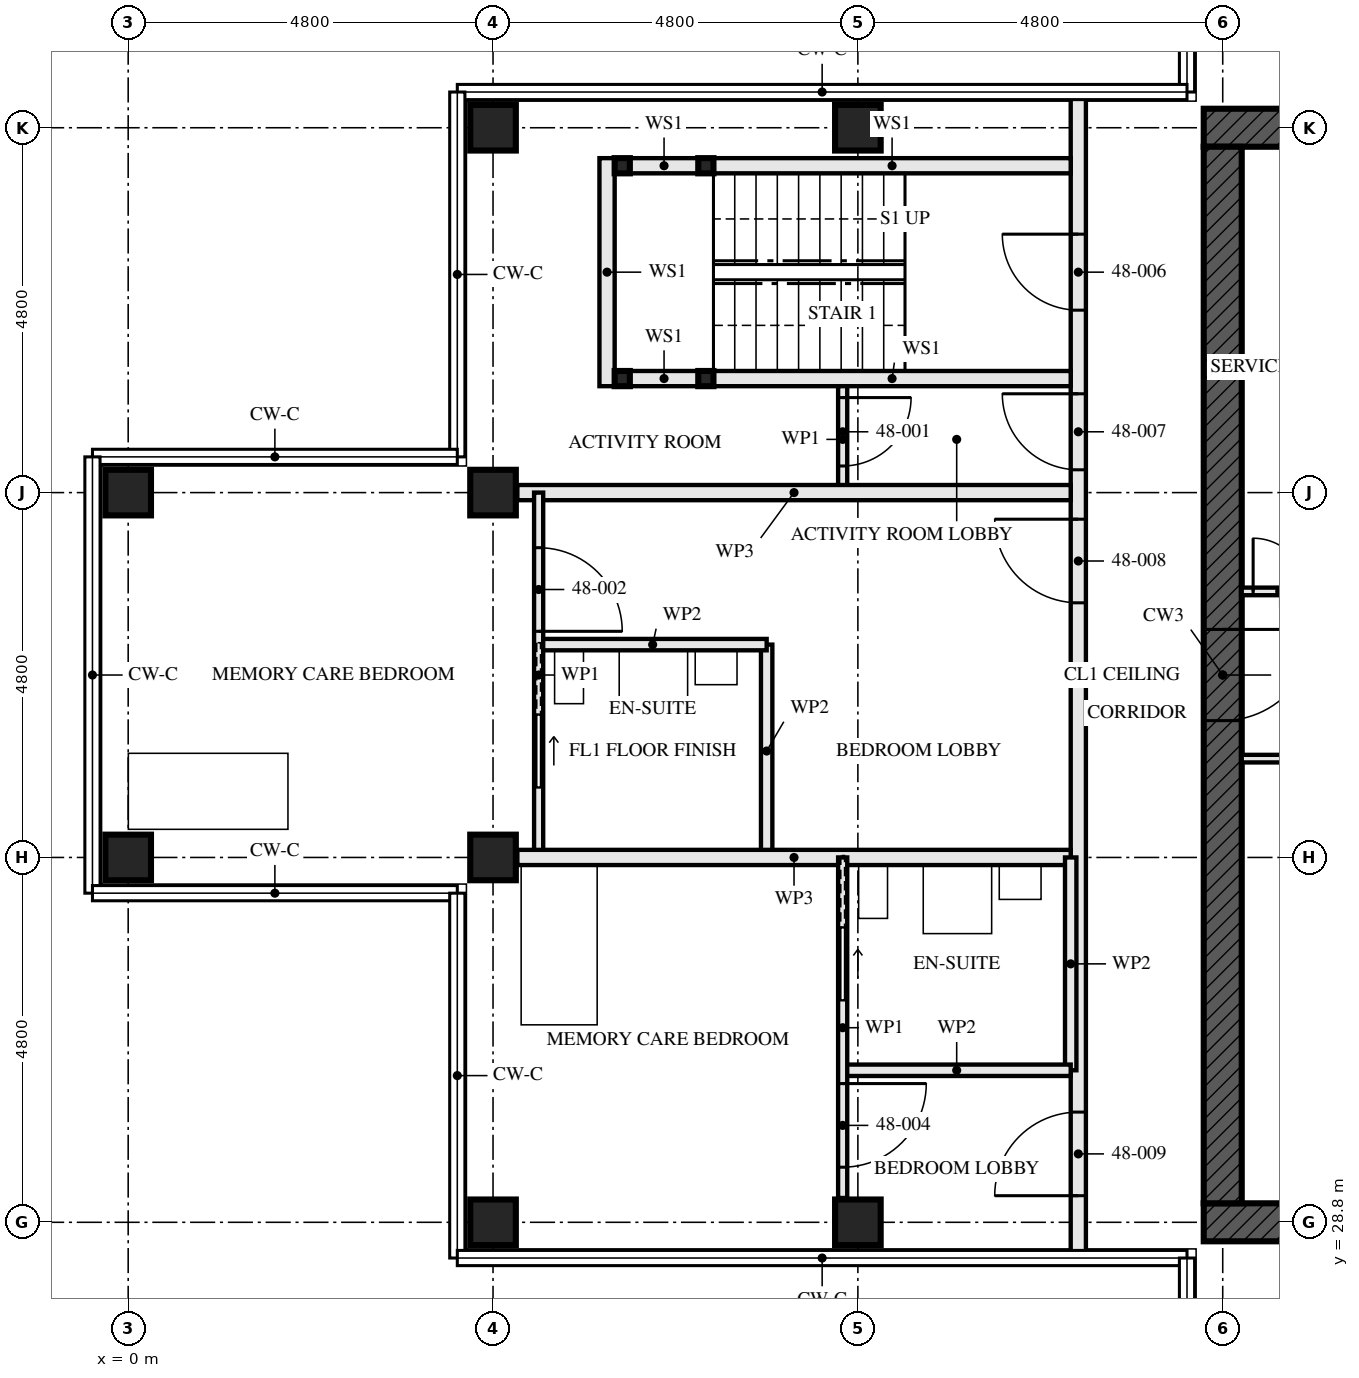
"""IFC4 building model, lengths in metres.
Left out: names, types, materials, properties, quantities, classifications, styles, units other than length and angle.
Written with IfcOpenShell. Run it as: python <this file> out.ifc"""

import sys

from ifc_helpers import new_model, si_unit, direction, frame, frame_2d, origin, origin_2d, place, context, subcontext, project, spatial, rectangle, hollow_rectangle, extrude, element, fill, save


model = new_model("IFC4")
c1 = context("Model", 3, precision=1e-05, world=origin(), true_north=direction((0.0, 1.0)))
c2 = subcontext(c1, "Body", "Model", "MODEL_VIEW")
j1 = project(units=[si_unit("LENGTHUNIT", "METRE"), si_unit("PLANEANGLEUNIT", "RADIAN")], contexts=[c1])
p1 = place(None, origin())
s1 = spatial("IfcSite", under=j1, at=p1, CompositionType="ELEMENT")
p2 = place(p1, origin())
s2 = spatial("IfcBuilding", under=s1, at=p2, CompositionType="ELEMENT")
p3 = place(p2, frame((0.0, 0.0, 176.0)))
s3 = spatial("IfcBuildingStorey", under=s2, at=p3, CompositionType="ELEMENT", Elevation=176.0)
for number, where, z_axis, x_axis in (
    (1, (0.0, 33.6, 0.0), (0.0, 0.0, 1.0), (0.0, 1.0, 0.0)),
    (2, (0.0, 38.4, 0.0), (0.0, 0.0, 1.0), (0.0, 1.0, 0.0)),
    (3, (4.8, 28.8, 0.0), (0.0, 0.0, 1.0), (0.0, 1.0, 0.0)),
    (4, (4.8, 33.6, 0.0), (0.0, 0.0, 1.0), (0.0, 1.0, 0.0)),
    (5, (4.8, 38.4, 0.0), (0.0, 0.0, 1.0), (0.0, 1.0, 0.0)),
    (6, (4.8, 43.2, 0.0), (0.0, 0.0, 1.0), (0.0, 1.0, 0.0)),
    (7, (9.6, 28.8, 0.0), (0.0, 0.0, 1.0), (0.0, 1.0, 0.0)),
    (8, (9.6, 43.2, 0.0), (0.0, 0.0, 1.0), (0.0, 1.0, 0.0)),
):
    element("IfcColumn", number, at=place(p3, frame(where, z_axis=z_axis, x_axis=x_axis)), inside=s3, PredefinedType="COLUMN", context=c2, shape_type="SweptSolid", body=[
        extrude(hollow_rectangle(XDim=0.6, YDim=0.6, WallThickness=0.08, at=origin_2d()), origin(), (0.0, 0.0, 1.0), 3.5),
    ])
p4 = place(p3, frame((14.15, 28.8, -0.17), z_axis=(0.0, 0.0, 1.0), x_axis=(1.0, 0.0, 0.0)))
e9 = element("IfcWall", 9, at=p4, inside=s3, PredefinedType="SHEAR", context=c2, shape_type="SweptSolid", body=[
    extrude(rectangle(XDim=14.9, YDim=0.5, at=frame_2d((7.45, 0.0))), origin(), (0.0, 0.0, 1.0), 3.5),
])
p5 = place(p4, frame((6.85, 0.0, 0.17)))
e10 = element("IfcOpeningElement", 10, at=p5, cuts=e9, PredefinedType="OPENING", context=c2, shape_type="SweptSolid", body=[
    extrude(rectangle(XDim=1.2, YDim=2.1, at=frame_2d((0.6, 1.05))), frame((0.0, 0.26, 0.0), z_axis=(0.0, -1.0, 0.0), x_axis=(1.0, 0.0, 0.0)), (0.0, 0.0, 1.0), 0.521),
])
p6 = place(p3, frame((29.05, 43.2, -0.17), z_axis=(0.0, 0.0, 1.0), x_axis=(-1.0, 0.0, 0.0)))
e11 = element("IfcWall", 11, at=p6, inside=s3, PredefinedType="SHEAR", context=c2, shape_type="SweptSolid", body=[
    extrude(rectangle(XDim=14.9, YDim=0.5, at=frame_2d((7.45, 0.0))), origin(), (0.0, 0.0, 1.0), 3.5),
])
p7 = place(p6, frame((6.85, 0.0, 0.17)))
e12 = element("IfcOpeningElement", 12, at=p7, cuts=e11, PredefinedType="OPENING", context=c2, shape_type="SweptSolid", body=[
    extrude(rectangle(XDim=1.2, YDim=2.1, at=frame_2d((0.6, 1.05))), frame((0.0, 0.26, 0.0), z_axis=(0.0, -1.0, 0.0), x_axis=(1.0, 0.0, 0.0)), (0.0, 0.0, 1.0), 0.521),
])
p8 = place(p3, frame((14.4, 42.95, -0.17), z_axis=(0.0, 0.0, 1.0), x_axis=(0.0, -1.0, 0.0)))
e13 = element("IfcWall", 13, at=p8, inside=s3, PredefinedType="SHEAR", context=c2, shape_type="SweptSolid", body=[
    extrude(rectangle(XDim=13.9, YDim=0.5, at=frame_2d((6.95, 0.0))), origin(), (0.0, 0.0, 1.0), 3.5),
])
p9 = place(p8, frame((6.35, 0.0, 0.17)))
e14 = element("IfcOpeningElement", 14, at=p9, cuts=e13, PredefinedType="OPENING", context=c2, shape_type="SweptSolid", body=[
    extrude(rectangle(XDim=1.2, YDim=2.1, at=frame_2d((0.6, 1.05))), frame((0.0, 0.26, 0.0), z_axis=(0.0, -1.0, 0.0), x_axis=(1.0, 0.0, 0.0)), (0.0, 0.0, 1.0), 0.521),
])
for number, where, z_axis, x_axis in (
    (15, (6.5, 42.7, 0.0), (0.0, 0.0, 1.0), (1.0, 0.0, 0.0)),
    (16, (6.5, 39.9, 0.0), (0.0, 0.0, 1.0), (1.0, 0.0, 0.0)),
    (17, (7.6, 42.7, 0.0), (0.0, 0.0, 1.0), (1.0, 0.0, 0.0)),
    (18, (7.6, 39.9, 0.0), (0.0, 0.0, 1.0), (1.0, 0.0, 0.0)),
):
    element("IfcColumn", number, at=place(p3, frame(where, z_axis=z_axis, x_axis=x_axis)), inside=s3, PredefinedType="COLUMN", context=c2, shape_type="SweptSolid", body=[
        extrude(hollow_rectangle(XDim=0.2, YDim=0.2, WallThickness=0.008, at=origin_2d()), origin(), (0.0, 0.0, 1.0), 3.33),
    ])
p10 = place(p3, frame((6.6, 42.7, 0.0), z_axis=(0.0, 0.0, 1.0), x_axis=(1.0, 0.0, 0.0)))
e19 = element("IfcWall", 19, at=p10, inside=s3, PredefinedType="SOLIDWALL", context=c2, shape_type="SweptSolid", body=[
    extrude(rectangle(XDim=0.9, YDim=0.2, at=frame_2d((0.45, 0.0))), origin(), (0.0, 0.0, 1.0), 2.99),
])
p11 = place(p3, frame((7.7, 42.7, 0.0), z_axis=(0.0, 0.0, 1.0), x_axis=(1.0, 0.0, 0.0)))
e20 = element("IfcWall", 20, at=p11, inside=s3, PredefinedType="SOLIDWALL", context=c2, shape_type="SweptSolid", body=[
    extrude(rectangle(XDim=4.7, YDim=0.2, at=frame_2d((2.35, 0.0))), origin(), (0.0, 0.0, 1.0), 2.99),
])
p12 = place(p3, frame((6.6, 39.9, 0.0), z_axis=(0.0, 0.0, 1.0), x_axis=(1.0, 0.0, 0.0)))
e21 = element("IfcWall", 21, at=p12, inside=s3, PredefinedType="SOLIDWALL", context=c2, shape_type="SweptSolid", body=[
    extrude(rectangle(XDim=0.9, YDim=0.2, at=frame_2d((0.45, 0.0))), origin(), (0.0, 0.0, 1.0), 2.99),
])
p13 = place(p3, frame((7.7, 39.9, 0.0), z_axis=(0.0, 0.0, 1.0), x_axis=(1.0, 0.0, 0.0)))
e22 = element("IfcWall", 22, at=p13, inside=s3, PredefinedType="SOLIDWALL", context=c2, shape_type="SweptSolid", body=[
    extrude(rectangle(XDim=4.7, YDim=0.2, at=frame_2d((2.35, 0.0))), origin(), (0.0, 0.0, 1.0), 2.99),
])
p14 = place(p3, frame((6.3, 42.8, 0.0), z_axis=(0.0, 0.0, 1.0), x_axis=(0.0, -1.0, 0.0)))
e23 = element("IfcWall", 23, at=p14, inside=s3, PredefinedType="SOLIDWALL", context=c2, shape_type="SweptSolid", body=[
    extrude(rectangle(XDim=3.0, YDim=0.2, at=frame_2d((1.5, 0.0))), origin(), (0.0, 0.0, 1.0), 3.33),
])
p15 = place(p3, frame((9.4, 39.8, 0.0), z_axis=(0.0, 0.0, 1.0), x_axis=(0.0, -1.0, 0.0)))
e24 = element("IfcWall", 24, at=p15, inside=s3, PredefinedType="PARTITIONING", context=c2, shape_type="SweptSolid", body=[
    extrude(rectangle(XDim=1.4, YDim=0.12, at=frame_2d((0.7, 0.0))), origin(), (0.0, 0.0, 1.0), 3.33),
])
p16 = place(p15, frame((0.15, 0.0, 0.0)))
e25 = element("IfcOpeningElement", 25, at=p16, cuts=e24, PredefinedType="OPENING", context=c2, shape_type="SweptSolid", body=[
    extrude(rectangle(XDim=0.9, YDim=2.1, at=frame_2d((0.45, 1.05))), frame((0.0, 0.071, 0.0), z_axis=(0.0, -1.0, 0.0), x_axis=(1.0, 0.0, 0.0)), (0.0, 0.0, 1.0), 0.141),
])
p17 = place(p3, frame((5.12, 38.4, 0.0), z_axis=(0.0, 0.0, 1.0), x_axis=(1.0, 0.0, 0.0)))
e26 = element("IfcWall", 26, at=p17, inside=s3, PredefinedType="PARTITIONING", context=c2, shape_type="SweptSolid", body=[
    extrude(rectangle(XDim=7.28, YDim=0.2, at=frame_2d((3.64, 0.0))), origin(), (0.0, 0.0, 1.0), 2.55),
])
p18 = place(p3, frame((5.4, 36.4, 0.0), z_axis=(0.0, 0.0, 1.0), x_axis=(1.0, 0.0, 0.0)))
e27 = element("IfcWall", 27, at=p18, inside=s3, PredefinedType="PARTITIONING", context=c2, shape_type="SweptSolid", body=[
    extrude(rectangle(XDim=3.0, YDim=0.15, at=frame_2d((1.5, 0.0))), origin(), (0.0, 0.0, 1.0), 3.33),
])
p19 = place(p3, frame((8.4, 36.4, 0.0), z_axis=(0.0, 0.0, 1.0), x_axis=(0.0, -1.0, 0.0)))
e28 = element("IfcWall", 28, at=p19, inside=s3, PredefinedType="PARTITIONING", context=c2, shape_type="SweptSolid", body=[
    extrude(rectangle(XDim=2.8, YDim=0.15, at=frame_2d((1.4, 0.0))), origin(), (0.0, 0.0, 1.0), 3.33),
])
p20 = place(p3, frame((5.4, 38.4, 0.0), z_axis=(0.0, 0.0, 1.0), x_axis=(0.0, -1.0, 0.0)))
e29 = element("IfcWall", 29, at=p20, inside=s3, PredefinedType="PARTITIONING", context=c2, shape_type="SweptSolid", body=[
    extrude(rectangle(XDim=4.8, YDim=0.12, at=frame_2d((2.4, 0.0))), origin(), (0.0, 0.0, 1.0), 3.33),
])
p21 = place(p20, frame((0.725, 0.0, 0.0)))
e30 = element("IfcOpeningElement", 30, at=p21, cuts=e29, PredefinedType="OPENING", context=c2, shape_type="SweptSolid", body=[
    extrude(rectangle(XDim=1.1, YDim=2.1, at=frame_2d((0.55, 1.05))), frame((0.0, 0.071, 0.0), z_axis=(0.0, -1.0, 0.0), x_axis=(1.0, 0.0, 0.0)), (0.0, 0.0, 1.0), 0.141),
])
p22 = place(p20, frame((2.925, 0.0, 0.0)))
e31 = element("IfcOpeningElement", 31, at=p22, cuts=e29, PredefinedType="OPENING", context=c2, shape_type="SweptSolid", body=[
    extrude(rectangle(XDim=0.95, YDim=2.1, at=frame_2d((0.475, 1.05))), frame((0.0, 0.071, 0.0), z_axis=(0.0, -1.0, 0.0), x_axis=(1.0, 0.0, 0.0)), (0.0, 0.0, 1.0), 0.141),
])
p23 = place(p3, frame((5.12, 33.6, 0.0), z_axis=(0.0, 0.0, 1.0), x_axis=(1.0, 0.0, 0.0)))
e32 = element("IfcWall", 32, at=p23, inside=s3, PredefinedType="PARTITIONING", context=c2, shape_type="SweptSolid", body=[
    extrude(rectangle(XDim=7.28, YDim=0.2, at=frame_2d((3.64, 0.0))), origin(), (0.0, 0.0, 1.0), 2.55),
])
p24 = place(p3, frame((9.4, 30.8, 0.0), z_axis=(0.0, 0.0, 1.0), x_axis=(1.0, 0.0, 0.0)))
e33 = element("IfcWall", 33, at=p24, inside=s3, PredefinedType="PARTITIONING", context=c2, shape_type="SweptSolid", body=[
    extrude(rectangle(XDim=3.0, YDim=0.15, at=frame_2d((1.5, 0.0))), origin(), (0.0, 0.0, 1.0), 3.33),
])
p25 = place(p3, frame((12.4, 33.6, 0.0), z_axis=(0.0, 0.0, 1.0), x_axis=(0.0, -1.0, 0.0)))
e34 = element("IfcWall", 34, at=p25, inside=s3, PredefinedType="PARTITIONING", context=c2, shape_type="SweptSolid", body=[
    extrude(rectangle(XDim=2.8, YDim=0.15, at=frame_2d((1.4, 0.0))), origin(), (0.0, 0.0, 1.0), 3.33),
])
p26 = place(p3, frame((9.4, 33.6, 0.0), z_axis=(0.0, 0.0, 1.0), x_axis=(0.0, -1.0, 0.0)))
e35 = element("IfcWall", 35, at=p26, inside=s3, PredefinedType="PARTITIONING", context=c2, shape_type="SweptSolid", body=[
    extrude(rectangle(XDim=4.48, YDim=0.12, at=frame_2d((2.24, 0.0))), origin(), (0.0, 0.0, 1.0), 3.33),
])
p27 = place(p26, frame((2.975, 0.0, 0.0)))
e36 = element("IfcOpeningElement", 36, at=p27, cuts=e35, PredefinedType="OPENING", context=c2, shape_type="SweptSolid", body=[
    extrude(rectangle(XDim=1.1, YDim=2.1, at=frame_2d((0.55, 1.05))), frame((0.0, 0.071, 0.0), z_axis=(0.0, -1.0, 0.0), x_axis=(1.0, 0.0, 0.0)), (0.0, 0.0, 1.0), 0.141),
])
p28 = place(p26, frame((0.925, 0.0, 0.0)))
e37 = element("IfcOpeningElement", 37, at=p28, cuts=e35, PredefinedType="OPENING", context=c2, shape_type="SweptSolid", body=[
    extrude(rectangle(XDim=0.95, YDim=2.1, at=frame_2d((0.475, 1.05))), frame((0.0, 0.071, 0.0), z_axis=(0.0, -1.0, 0.0), x_axis=(1.0, 0.0, 0.0)), (0.0, 0.0, 1.0), 0.141),
])
p29 = place(p3, frame((12.5, 43.65, 0.0), z_axis=(0.0, 0.0, 1.0), x_axis=(0.0, -1.0, 0.0)))
e38 = element("IfcWall", 38, at=p29, inside=s3, PredefinedType="PARTITIONING", context=c2, shape_type="SweptSolid", body=[
    extrude(rectangle(XDim=15.3, YDim=0.2, at=frame_2d((7.65, 0.0))), origin(), (0.0, 0.0, 1.0), 2.32),
])
p30 = place(p29, frame((1.85, 0.0, 0.0)))
e39 = element("IfcOpeningElement", 39, at=p30, cuts=e38, PredefinedType="OPENING", context=c2, shape_type="SweptSolid", body=[
    extrude(rectangle(XDim=1.0, YDim=2.1, at=frame_2d((0.5, 1.05))), frame((0.0, 0.111, 0.0), z_axis=(0.0, -1.0, 0.0), x_axis=(1.0, 0.0, 0.0)), (0.0, 0.0, 1.0), 0.221),
])
p31 = place(p29, frame((3.95, 0.0, 0.0)))
e40 = element("IfcOpeningElement", 40, at=p31, cuts=e38, PredefinedType="OPENING", context=c2, shape_type="SweptSolid", body=[
    extrude(rectangle(XDim=1.0, YDim=2.1, at=frame_2d((0.5, 1.05))), frame((0.0, 0.111, 0.0), z_axis=(0.0, -1.0, 0.0), x_axis=(1.0, 0.0, 0.0)), (0.0, 0.0, 1.0), 0.221),
])
p32 = place(p29, frame((5.6, 0.0, 0.0)))
e41 = element("IfcOpeningElement", 41, at=p32, cuts=e38, PredefinedType="OPENING", context=c2, shape_type="SweptSolid", body=[
    extrude(rectangle(XDim=1.1, YDim=2.1, at=frame_2d((0.55, 1.05))), frame((0.0, 0.111, 0.0), z_axis=(0.0, -1.0, 0.0), x_axis=(1.0, 0.0, 0.0)), (0.0, 0.0, 1.0), 0.221),
])
p33 = place(p29, frame((13.4, 0.0, 0.0)))
e42 = element("IfcOpeningElement", 42, at=p33, cuts=e38, PredefinedType="OPENING", context=c2, shape_type="SweptSolid", body=[
    extrude(rectangle(XDim=1.1, YDim=2.1, at=frame_2d((0.55, 1.05))), frame((0.0, 0.111, 0.0), z_axis=(0.0, -1.0, 0.0), x_axis=(1.0, 0.0, 0.0)), (0.0, 0.0, 1.0), 0.221),
])
p34 = place(p3, frame((14.65, 34.9, 0.0), z_axis=(0.0, 0.0, 1.0), x_axis=(1.0, 0.0, 0.0)))
e43 = element("IfcWall", 43, at=p34, inside=s3, PredefinedType="SOLIDWALL", context=c2, shape_type="SweptSolid", body=[
    extrude(rectangle(XDim=5.9, YDim=0.1, at=frame_2d((2.95, 0.0))), origin(), (0.0, 0.0, 1.0), 3.33),
])
p35 = place(p34, frame((1.6, 0.0, 0.0)))
e44 = element("IfcOpeningElement", 44, at=p35, cuts=e43, PredefinedType="OPENING", context=c2, shape_type="SweptSolid", body=[
    extrude(rectangle(XDim=0.7, YDim=2.1, at=frame_2d((0.35, 1.05))), frame((0.0, 0.061, 0.0), z_axis=(0.0, -1.0, 0.0), x_axis=(1.0, 0.0, 0.0)), (0.0, 0.0, 1.0), 0.121),
])
p36 = place(p3, frame((14.65, 37.1, 0.0), z_axis=(0.0, 0.0, 1.0), x_axis=(1.0, 0.0, 0.0)))
e45 = element("IfcWall", 45, at=p36, inside=s3, PredefinedType="SOLIDWALL", context=c2, shape_type="SweptSolid", body=[
    extrude(rectangle(XDim=5.9, YDim=0.1, at=frame_2d((2.95, 0.0))), origin(), (0.0, 0.0, 1.0), 3.33),
])
p37 = place(p36, frame((0.15, 0.0, 0.0)))
e46 = element("IfcOpeningElement", 46, at=p37, cuts=e45, PredefinedType="OPENING", context=c2, shape_type="SweptSolid", body=[
    extrude(rectangle(XDim=0.7, YDim=2.1, at=frame_2d((0.35, 1.05))), frame((0.0, 0.061, 0.0), z_axis=(0.0, -1.0, 0.0), x_axis=(1.0, 0.0, 0.0)), (0.0, 0.0, 1.0), 0.121),
])
p38 = place(p36, frame((1.5, 0.0, 0.0)))
e47 = element("IfcOpeningElement", 47, at=p38, cuts=e45, PredefinedType="OPENING", context=c2, shape_type="SweptSolid", body=[
    extrude(rectangle(XDim=0.9, YDim=2.1, at=frame_2d((0.45, 1.05))), frame((0.0, 0.061, 0.0), z_axis=(0.0, -1.0, 0.0), x_axis=(1.0, 0.0, 0.0)), (0.0, 0.0, 1.0), 0.121),
])
p39 = place(p16, origin())
e48 = element("IfcDoor", 48, at=p39, inside=s3, OperationType="SINGLE_SWING_RIGHT", PredefinedType="DOOR", context=c2, shape_type="SweptSolid", body=[
    extrude(rectangle(XDim=0.9, YDim=2.1, at=frame_2d((0.45, 1.05))), frame((0.0, 0.022, 0.0), z_axis=(0.0, -1.0, 0.0), x_axis=(1.0, 0.0, 0.0)), (0.0, 0.0, 1.0), 0.044),
])
fill(e25, e48)
p40 = place(p21, origin())
e49 = element("IfcDoor", 49, at=p40, inside=s3, OperationType="SINGLE_SWING_LEFT", PredefinedType="DOOR", context=c2, shape_type="SweptSolid", body=[
    extrude(rectangle(XDim=1.1, YDim=2.1, at=frame_2d((0.55, 1.05))), frame((0.0, 0.022, 0.0), z_axis=(0.0, -1.0, 0.0), x_axis=(1.0, 0.0, 0.0)), (0.0, 0.0, 1.0), 0.044),
])
fill(e30, e49)
p41 = place(p22, origin())
e50 = element("IfcDoor", 50, at=p41, inside=s3, OperationType="SLIDING_TO_RIGHT", PredefinedType="DOOR", context=c2, shape_type="SweptSolid", body=[
    extrude(rectangle(XDim=0.95, YDim=2.1, at=frame_2d((0.475, 1.05))), frame((0.0, 0.022, 0.0), z_axis=(0.0, -1.0, 0.0), x_axis=(1.0, 0.0, 0.0)), (0.0, 0.0, 1.0), 0.044),
])
fill(e31, e50)
p42 = place(p27, origin())
e51 = element("IfcDoor", 51, at=p42, inside=s3, OperationType="SINGLE_SWING_RIGHT", PredefinedType="DOOR", context=c2, shape_type="SweptSolid", body=[
    extrude(rectangle(XDim=1.1, YDim=2.1, at=frame_2d((0.55, 1.05))), frame((0.0, 0.022, 0.0), z_axis=(0.0, -1.0, 0.0), x_axis=(1.0, 0.0, 0.0)), (0.0, 0.0, 1.0), 0.044),
])
fill(e36, e51)
p43 = place(p28, origin())
e52 = element("IfcDoor", 52, at=p43, inside=s3, OperationType="SLIDING_TO_RIGHT", PredefinedType="DOOR", context=c2, shape_type="SweptSolid", body=[
    extrude(rectangle(XDim=0.95, YDim=2.1, at=frame_2d((0.475, 1.05))), frame((0.0, 0.022, 0.0), z_axis=(0.0, -1.0, 0.0), x_axis=(1.0, 0.0, 0.0)), (0.0, 0.0, 1.0), 0.044),
])
fill(e37, e52)
p44 = place(p30, frame((1.0, 0.0, 0.0), z_axis=(0.0, 0.0, 1.0), x_axis=(-1.0, 0.0, 0.0)))
e53 = element("IfcDoor", 53, at=p44, inside=s3, OperationType="SINGLE_SWING_LEFT", PredefinedType="DOOR", context=c2, shape_type="SweptSolid", body=[
    extrude(rectangle(XDim=1.0, YDim=2.1, at=frame_2d((0.5, 1.05))), frame((0.0, 0.032, 0.0), z_axis=(0.0, -1.0, 0.0), x_axis=(1.0, 0.0, 0.0)), (0.0, 0.0, 1.0), 0.064),
])
fill(e39, e53)
p45 = place(p31, frame((1.0, 0.0, 0.0), z_axis=(0.0, 0.0, 1.0), x_axis=(-1.0, 0.0, 0.0)))
e54 = element("IfcDoor", 54, at=p45, inside=s3, OperationType="SINGLE_SWING_LEFT", PredefinedType="DOOR", context=c2, shape_type="SweptSolid", body=[
    extrude(rectangle(XDim=1.0, YDim=2.1, at=frame_2d((0.5, 1.05))), frame((0.0, 0.027, 0.0), z_axis=(0.0, -1.0, 0.0), x_axis=(1.0, 0.0, 0.0)), (0.0, 0.0, 1.0), 0.054),
])
fill(e40, e54)
p46 = place(p32, frame((1.1, 0.0, 0.0), z_axis=(0.0, 0.0, 1.0), x_axis=(-1.0, 0.0, 0.0)))
e55 = element("IfcDoor", 55, at=p46, inside=s3, OperationType="SINGLE_SWING_LEFT", PredefinedType="DOOR", context=c2, shape_type="SweptSolid", body=[
    extrude(rectangle(XDim=1.1, YDim=2.1, at=frame_2d((0.55, 1.05))), frame((0.0, 0.027, 0.0), z_axis=(0.0, -1.0, 0.0), x_axis=(1.0, 0.0, 0.0)), (0.0, 0.0, 1.0), 0.054),
])
fill(e41, e55)
p47 = place(p33, frame((1.1, 0.0, 0.0), z_axis=(0.0, 0.0, 1.0), x_axis=(-1.0, 0.0, 0.0)))
e56 = element("IfcDoor", 56, at=p47, inside=s3, OperationType="SINGLE_SWING_RIGHT", PredefinedType="DOOR", context=c2, shape_type="SweptSolid", body=[
    extrude(rectangle(XDim=1.1, YDim=2.1, at=frame_2d((0.55, 1.05))), frame((0.0, 0.027, 0.0), z_axis=(0.0, -1.0, 0.0), x_axis=(1.0, 0.0, 0.0)), (0.0, 0.0, 1.0), 0.054),
])
fill(e42, e56)
p48 = place(p37, origin())
e57 = element("IfcDoor", 57, at=p48, inside=s3, OperationType="SINGLE_SWING_RIGHT", PredefinedType="DOOR", context=c2, shape_type="SweptSolid", body=[
    extrude(rectangle(XDim=0.7, YDim=2.1, at=frame_2d((0.35, 1.05))), frame((0.0, 0.027, 0.0), z_axis=(0.0, -1.0, 0.0), x_axis=(1.0, 0.0, 0.0)), (0.0, 0.0, 1.0), 0.054),
])
fill(e46, e57)
p49 = place(p9, origin())
e58 = element("IfcDoor", 58, at=p49, inside=s3, OperationType="SINGLE_SWING_LEFT", PredefinedType="DOOR", context=c2, shape_type="SweptSolid", body=[
    extrude(rectangle(XDim=1.2, YDim=2.1, at=frame_2d((0.6, 1.05))), frame((0.0, 0.027, 0.0), z_axis=(0.0, -1.0, 0.0), x_axis=(1.0, 0.0, 0.0)), (0.0, 0.0, 1.0), 0.054),
])
fill(e14, e58)
save(model, sys.argv[1])
